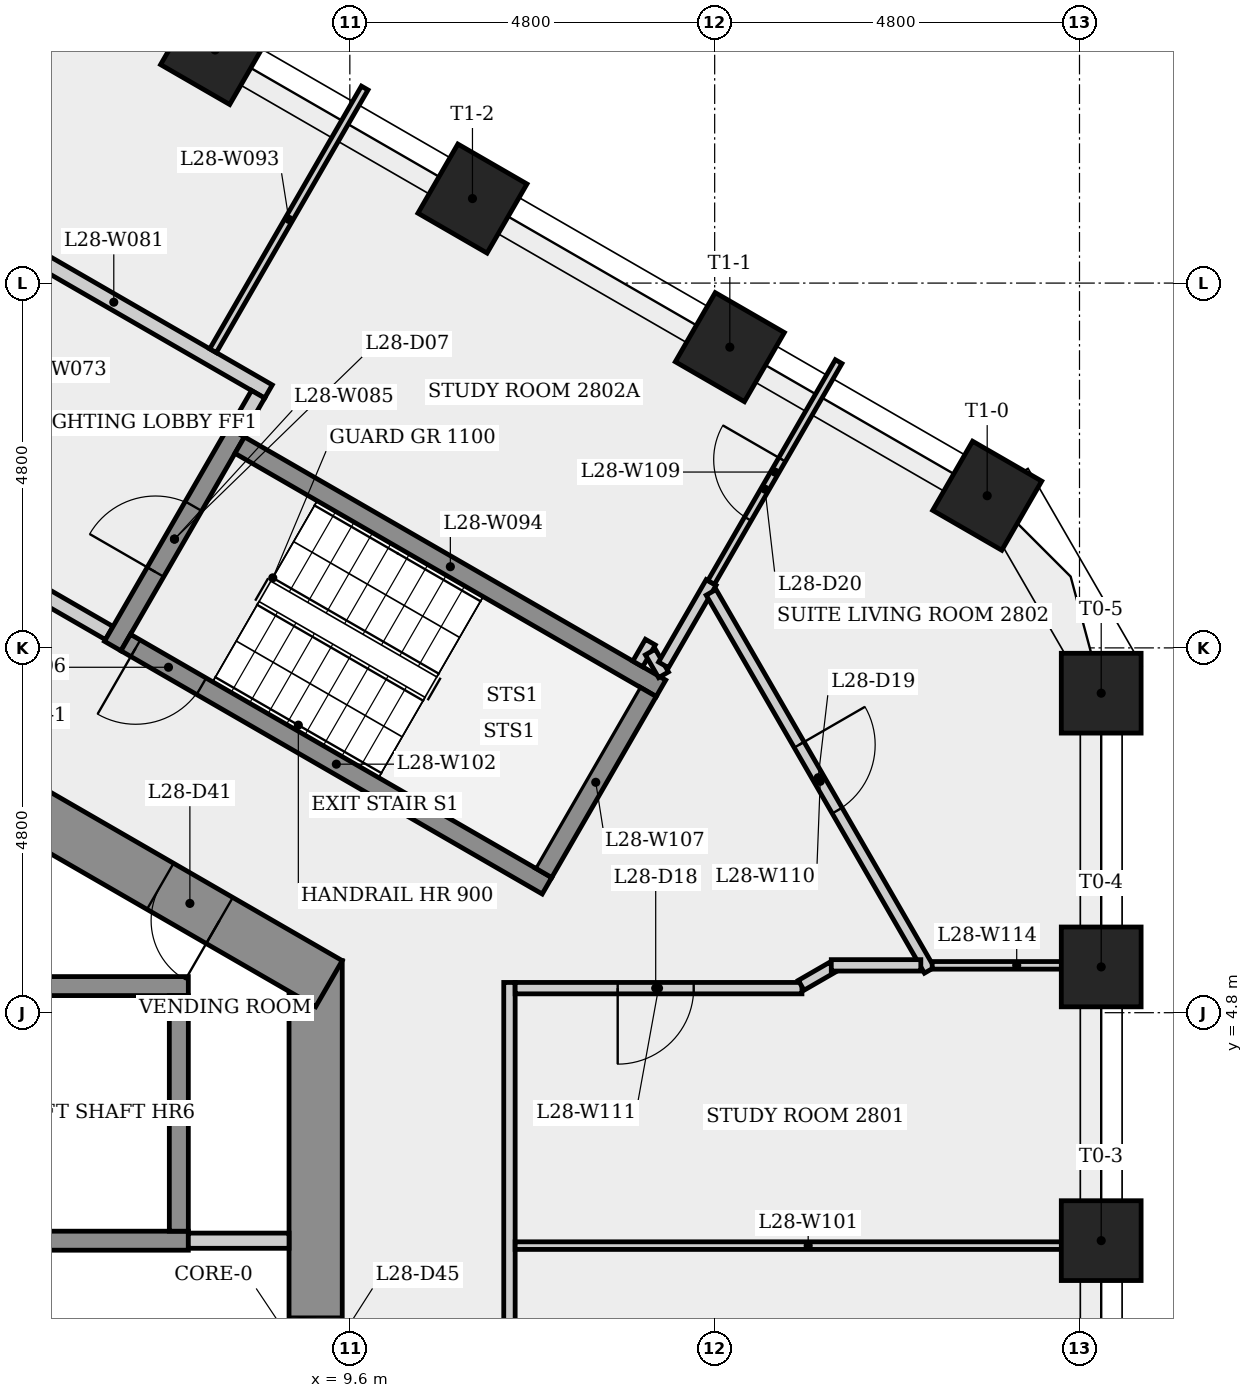
"""IFC4 building model, lengths in metres.
Left out: names, types, materials, properties, quantities, classifications, styles, units other than length and angle.
Written with IfcOpenShell. Run it as: python <this file> out.ifc"""

import sys

from ifc_helpers import new_model, si_unit, direction, frame, frame_2d, origin, origin_2d, place, context, subcontext, project, spatial, rectangle, extrude, element, fill, save


model = new_model("IFC4")
c1 = context("Model", 3, precision=1e-05, world=origin(), true_north=direction((0.0, 1.0)))
c2 = subcontext(c1, "Body", "Model", "MODEL_VIEW")
j1 = project(units=[si_unit("LENGTHUNIT", "METRE"), si_unit("PLANEANGLEUNIT", "RADIAN")], contexts=[c1])
p1 = place(None, origin())
s1 = spatial("IfcSite", under=j1, at=p1, CompositionType="ELEMENT")
p2 = place(p1, origin())
s2 = spatial("IfcBuilding", under=s1, at=p2, CompositionType="ELEMENT")
p3 = place(p2, frame((0.0, 0.0, 106.9)))
s3 = spatial("IfcBuildingStorey", under=s2, at=p3, CompositionType="ELEMENT", Elevation=106.9)
p4 = place(p3, frame((9.15, -5.485, 0.0), z_axis=(0.0, 0.0, 1.0), x_axis=(0.0, 1.0, 0.0)))
e1 = element("IfcWall", 1, at=p4, inside=s3, PredefinedType="SHEAR", context=c2, shape_type="SweptSolid", body=[
    extrude(rectangle(XDim=10.97, YDim=0.7, at=frame_2d((5.485, 0.0))), origin(), (0.0, 0.0, 1.0), 3.4),
])
p5 = place(p4, frame((4.685, 0.0, 0.0)))
e2 = element("IfcOpeningElement", 2, at=p5, cuts=e1, PredefinedType="OPENING", context=c2, shape_type="SweptSolid", body=[
    extrude(rectangle(XDim=1.6, YDim=2.1, at=frame_2d((0.8, 1.05))), frame((0.0, 0.36, 0.0), z_axis=(0.0, -1.0, 0.0), x_axis=(1.0, 0.0, 0.0)), (0.0, 0.0, 1.0), 0.72),
])
p6 = place(p3, frame((9.325, 5.182, 0.0), z_axis=(0.0, 0.0, 1.0), x_axis=(-0.866023993627, 0.500002442456, 0.0)))
e3 = element("IfcWall", 3, at=p6, inside=s3, PredefinedType="SHEAR", context=c2, shape_type="SweptSolid", body=[
    extrude(rectangle(XDim=10.97, YDim=0.7, at=frame_2d((5.485, 0.0))), origin(), (0.0, 0.0, 1.0), 3.4),
])
p7 = place(p6, frame((8.384, 0.0, 0.0)))
e4 = element("IfcOpeningElement", 4, at=p7, cuts=e3, PredefinedType="OPENING", context=c2, shape_type="SweptSolid", body=[
    extrude(rectangle(XDim=0.9, YDim=2.1, at=frame_2d((0.45, 1.05))), frame((0.0, 0.36, 0.0), z_axis=(0.0, -1.0, 0.0), x_axis=(1.0, 0.0, 0.0)), (0.0, 0.0, 1.0), 0.72),
])
p8 = place(p6, frame((1.663, 0.0, 0.0)))
e5 = element("IfcOpeningElement", 5, at=p8, cuts=e3, PredefinedType="OPENING", context=c2, shape_type="SweptSolid", body=[
    extrude(rectangle(XDim=0.9, YDim=2.1, at=frame_2d((0.45, 1.05))), frame((0.0, 0.36, 0.0), z_axis=(0.0, -1.0, 0.0), x_axis=(1.0, 0.0, 0.0)), (0.0, 0.0, 1.0), 0.72),
])
for number, where, z_axis, x_axis in (
    (6, (19.486, 1.801, 0.0), (0.0, 0.0, 1.0), (1.0, 0.0, 0.0)),
    (7, (19.486, 5.402, 0.0), (0.0, 0.0, 1.0), (1.0, 0.0, 0.0)),
    (8, (19.486, 9.004, 0.0), (0.0, 0.0, 1.0), (1.0, 0.0, 0.0)),
    (9, (17.986, 11.602, 0.0), (0.0, 0.0, 1.0), (0.5, 0.866, 0.0)),
    (10, (14.599, 13.557, 0.0), (0.0, 0.0, 1.0), (0.5, 0.866, 0.0)),
    (11, (11.213, 15.512, 0.0), (0.0, 0.0, 1.0), (0.5, 0.866, 0.0)),
    (12, (7.827, 17.467, 0.0), (0.0, 0.0, 1.0), (0.5, 0.866, 0.0)),
):
    element("IfcColumn", number, at=place(p3, frame(where, z_axis=z_axis, x_axis=x_axis)), inside=s3, PredefinedType="COLUMN", context=c2, shape_type="SweptSolid", body=[
        extrude(rectangle(XDim=1.05, YDim=1.05, at=origin_2d()), origin(), (0.0, 0.0, 1.0), 3.4),
    ])
p9 = place(p3, frame((-7.475, 1.8, 0.0), z_axis=(0.0, 0.0, 1.0), x_axis=(1.0, 0.0, 0.0)))
e13 = element("IfcWall", 13, at=p9, inside=s3, PredefinedType="SHEAR", context=c2, shape_type="SweptSolid", body=[
    extrude(rectangle(XDim=14.95, YDim=0.25, at=frame_2d((7.475, 0.0))), origin(), (0.0, 0.0, 1.0), 3.05),
])
p10 = place(p3, frame((-7.225, 5.15, 0.0), z_axis=(0.0, 0.0, 1.0), x_axis=(1.0, 0.0, 0.0)))
e14 = element("IfcWall", 14, at=p10, inside=s3, PredefinedType="SHEAR", context=c2, shape_type="SweptSolid", body=[
    extrude(rectangle(XDim=14.7, YDim=0.25, at=frame_2d((7.35, 0.0))), origin(), (0.0, 0.0, 1.0), 3.05),
])
p11 = place(p3, frame((4.459, 15.323, 0.0), z_axis=(0.0, 0.0, 1.0), x_axis=(0.866016039709, -0.500016218704, 0.0)))
e15 = element("IfcWall", 15, at=p11, inside=s3, PredefinedType="PARTITIONING", context=c2, shape_type="SweptSolid", body=[
    extrude(rectangle(XDim=4.7, YDim=0.2, at=frame_2d((2.35, 0.0))), origin(), (0.0, 0.0, 1.0), 3.05),
])
p12 = place(p3, frame((6.435, 9.795, 0.0), z_axis=(0.0, 0.0, 1.0), x_axis=(-0.866012907634, 0.500021643343, 0.0)))
e16 = element("IfcWall", 16, at=p12, inside=s3, PredefinedType="PARTITIONING", context=c2, shape_type="SweptSolid", body=[
    extrude(rectangle(XDim=4.45, YDim=0.2, at=frame_2d((2.225, 0.0))), origin(), (0.0, 0.0, 1.0), 3.05),
])
p13 = place(p12, frame((1.675, 0.0, 0.0)))
e17 = element("IfcOpeningElement", 17, at=p13, cuts=e16, PredefinedType="OPENING", context=c2, shape_type="SweptSolid", body=[
    extrude(rectangle(XDim=1.1, YDim=2.1, at=frame_2d((0.55, 1.05))), frame((0.0, 0.11, 0.0), z_axis=(0.0, -1.0, 0.0), x_axis=(1.0, 0.0, 0.0)), (0.0, 0.0, 1.0), 0.22),
])
p14 = place(p3, frame((6.48, 9.624, 0.0), z_axis=(0.0, 0.0, 1.0), x_axis=(0.500017246033, 0.866015446554, 0.0)))
e18 = element("IfcWall", 18, at=p14, inside=s3, PredefinedType="SHEAR", context=c2, shape_type="SweptSolid", body=[
    extrude(rectangle(XDim=3.25, YDim=0.25, at=frame_2d((1.625, 0.0))), origin(), (0.0, 0.0, 1.0), 3.05),
])
p15 = place(p14, frame((1.125, 0.0, 0.0)))
e19 = element("IfcOpeningElement", 19, at=p15, cuts=e18, PredefinedType="OPENING", context=c2, shape_type="SweptSolid", body=[
    extrude(rectangle(XDim=1.0, YDim=2.1, at=frame_2d((0.5, 1.05))), frame((0.0, 0.135, 0.0), z_axis=(0.0, -1.0, 0.0), x_axis=(1.0, 0.0, 0.0)), (0.0, 0.0, 1.0), 0.27),
])
p16 = place(p3, frame((7.475, 1.8, 0.0), z_axis=(0.0, 0.0, 1.0), x_axis=(1.0, 0.0, 0.0)))
e20 = element("IfcWall", 20, at=p16, inside=s3, PredefinedType="PARTITIONING", context=c2, shape_type="SweptSolid", body=[
    extrude(rectangle(XDim=1.325, YDim=0.2, at=frame_2d((0.663, 0.0))), origin(), (0.0, 0.0, 1.0), 3.05),
])
p17 = place(p3, frame((7.35, 5.025, 0.0), z_axis=(0.0, 0.0, 1.0), x_axis=(0.0, -1.0, 0.0)))
e21 = element("IfcWall", 21, at=p17, inside=s3, PredefinedType="SHEAR", context=c2, shape_type="SweptSolid", body=[
    extrude(rectangle(XDim=3.1, YDim=0.25, at=frame_2d((1.55, 0.0))), origin(), (0.0, 0.0, 1.0), 3.4),
])
p18 = place(p3, frame((7.8, 13.51, 0.0), z_axis=(0.0, 0.0, 1.0), x_axis=(0.500020748167, 0.866013424493, 0.0)))
e22 = element("IfcWall", 22, at=p18, inside=s3, PredefinedType="PARTITIONING", context=c2, shape_type="SweptSolid", body=[
    extrude(rectangle(XDim=3.991, YDim=0.1, at=frame_2d((1.996, 0.0))), origin(), (0.0, 0.0, 1.0), 3.05),
])
p19 = place(p3, frame((8.151, 12.268, 0.0), z_axis=(0.0, 0.0, 1.0), x_axis=(0.866025499775, -0.499999833739, 0.0)))
e23 = element("IfcWall", 23, at=p19, inside=s3, PredefinedType="SHEAR", context=c2, shape_type="SweptSolid", body=[
    extrude(rectangle(XDim=6.4, YDim=0.25, at=frame_2d((3.2, 0.0))), origin(), (0.0, 0.0, 1.0), 3.05),
])
p20 = place(p3, frame((8.393, 12.937, 0.0), z_axis=(0.0, 0.0, 1.0), x_axis=(-0.500065409566, -0.86598763626, 0.0)))
e24 = element("IfcWall", 24, at=p20, inside=s3, PredefinedType="PARTITIONING", context=c2, shape_type="SweptSolid", body=[
    extrude(rectangle(XDim=0.575, YDim=0.2, at=frame_2d((0.288, 0.0))), origin(), (0.0, 0.0, 1.0), 3.05),
])
p21 = place(p3, frame((11.7, -5.348, 0.0), z_axis=(0.0, 0.0, 1.0), x_axis=(0.0, 1.0, 0.0)))
e25 = element("IfcWall", 25, at=p21, inside=s3, PredefinedType="PARTITIONING", context=c2, shape_type="SweptSolid", body=[
    extrude(rectangle(XDim=10.546, YDim=0.15, at=frame_2d((5.273, 0.0))), origin(), (0.0, 0.0, 1.0), 3.05),
])
p22 = place(p21, frame((3.027, 0.0, 0.0)))
e26 = element("IfcOpeningElement", 26, at=p22, cuts=e25, PredefinedType="OPENING", context=c2, shape_type="SweptSolid", body=[
    extrude(rectangle(XDim=1.0, YDim=2.1, at=frame_2d((0.5, 1.05))), frame((0.0, 0.085, 0.0), z_axis=(0.0, -1.0, 0.0), x_axis=(1.0, 0.0, 0.0)), (0.0, 0.0, 1.0), 0.17),
])
p23 = place(p3, frame((11.775, 1.735, 0.0), z_axis=(0.0, 0.0, 1.0), x_axis=(1.0, 0.0, 0.0)))
e27 = element("IfcWall", 27, at=p23, inside=s3, PredefinedType="PARTITIONING", context=c2, shape_type="SweptSolid", body=[
    extrude(rectangle(XDim=7.711, YDim=0.1, at=frame_2d((3.855, 0.0))), origin(), (0.0, 0.0, 1.0), 3.05),
])
p24 = place(p3, frame((12.194, 6.47, 0.0), z_axis=(0.0, 0.0, 1.0), x_axis=(-0.866025499775, 0.499999833739, 0.0)))
e28 = element("IfcWall", 28, at=p24, inside=s3, PredefinedType="SHEAR", context=c2, shape_type="SweptSolid", body=[
    extrude(rectangle(XDim=6.4, YDim=0.25, at=frame_2d((3.2, 0.0))), origin(), (0.0, 0.0, 1.0), 3.05),
])
p25 = place(p24, frame((5.25, 0.0, 0.0)))
e29 = element("IfcOpeningElement", 29, at=p25, cuts=e28, PredefinedType="OPENING", context=c2, shape_type="SweptSolid", body=[
    extrude(rectangle(XDim=1.0, YDim=2.1, at=frame_2d((0.5, 1.05))), frame((0.0, 0.135, 0.0), z_axis=(0.0, -1.0, 0.0), x_axis=(1.0, 0.0, 0.0)), (0.0, 0.0, 1.0), 0.27),
])
p26 = place(p3, frame((13.388, 9.389, 0.0), z_axis=(0.0, 0.0, 1.0), x_axis=(0.499786267378, 0.866148767211, 0.0)))
e30 = element("IfcWall", 30, at=p26, inside=s3, PredefinedType="PARTITIONING", context=c2, shape_type="SweptSolid", body=[
    extrude(rectangle(XDim=0.331, YDim=0.15, at=frame_2d((0.166, 0.0))), origin(), (0.0, 0.0, 1.0), 3.05),
])
p27 = place(p3, frame((13.554, 9.546, 0.0), z_axis=(0.0, 0.0, 1.0), x_axis=(0.500535972651, -0.865715738613, 0.0)))
e31 = element("IfcWall", 31, at=p27, inside=s3, PredefinedType="PARTITIONING", context=c2, shape_type="SweptSolid", body=[
    extrude(rectangle(XDim=0.346, YDim=0.15, at=frame_2d((0.173, 0.0))), origin(), (0.0, 0.0, 1.0), 3.05),
])
p28 = place(p3, frame((13.523, 9.022, 0.0), z_axis=(0.0, 0.0, 1.0), x_axis=(-0.500034990121, -0.866005201286, 0.0)))
e32 = element("IfcWall", 32, at=p28, inside=s3, PredefinedType="SHEAR", context=c2, shape_type="SweptSolid", body=[
    extrude(rectangle(XDim=2.75, YDim=0.25, at=frame_2d((1.375, 0.0))), origin(), (0.0, 0.0, 1.0), 3.05),
])
p29 = place(p3, frame((13.727, 9.376, 0.0), z_axis=(0.0, 0.0, 1.0), x_axis=(0.500037327496, 0.866003851672, 0.0)))
e33 = element("IfcWall", 33, at=p29, inside=s3, PredefinedType="PARTITIONING", context=c2, shape_type="SweptSolid", body=[
    extrude(rectangle(XDim=1.253, YDim=0.15, at=frame_2d((0.626, 0.0))), origin(), (0.0, 0.0, 1.0), 3.05),
])
p30 = place(p3, frame((14.354, 10.461, 0.0), z_axis=(0.0, 0.0, 1.0), x_axis=(0.499997513821, 0.866026839176, 0.0)))
e34 = element("IfcWall", 34, at=p30, inside=s3, PredefinedType="PARTITIONING", context=c2, shape_type="SweptSolid", body=[
    extrude(rectangle(XDim=3.355, YDim=0.1, at=frame_2d((1.677, 0.0))), origin(), (0.0, 0.0, 1.0), 3.05),
])
p31 = place(p30, frame((0.967, 0.0, 0.0)))
e35 = element("IfcOpeningElement", 35, at=p31, cuts=e34, PredefinedType="OPENING", context=c2, shape_type="SweptSolid", body=[
    extrude(rectangle(XDim=0.9, YDim=2.1, at=frame_2d((0.45, 1.05))), frame((0.0, 0.06, 0.0), z_axis=(0.0, -1.0, 0.0), x_axis=(1.0, 0.0, 0.0)), (0.0, 0.0, 1.0), 0.12),
])
p32 = place(p3, frame((14.354, 10.331, 0.0), z_axis=(0.0, 0.0, 1.0), x_axis=(0.499980071345, -0.866036909293, 0.0)))
e36 = element("IfcWall", 36, at=p32, inside=s3, PredefinedType="PARTITIONING", context=c2, shape_type="SweptSolid", body=[
    extrude(rectangle(XDim=5.742, YDim=0.15, at=frame_2d((2.871, 0.0))), origin(), (0.0, 0.0, 1.0), 3.05),
])
p33 = place(p32, frame((2.316, 0.0, 0.0)))
e37 = element("IfcOpeningElement", 37, at=p33, cuts=e36, PredefinedType="OPENING", context=c2, shape_type="SweptSolid", body=[
    extrude(rectangle(XDim=1.0, YDim=2.1, at=frame_2d((0.5, 1.05))), frame((0.0, 0.085, 0.0), z_axis=(0.0, -1.0, 0.0), x_axis=(1.0, 0.0, 0.0)), (0.0, 0.0, 1.0), 0.17),
])
p34 = place(p3, frame((15.548, 5.123, 0.0), z_axis=(0.0, 0.0, 1.0), x_axis=(-1.0, 0.0, 0.0)))
e38 = element("IfcWall", 38, at=p34, inside=s3, PredefinedType="PARTITIONING", context=c2, shape_type="SweptSolid", body=[
    extrude(rectangle(XDim=3.773, YDim=0.15, at=frame_2d((1.887, 0.0))), origin(), (0.0, 0.0, 1.0), 3.05),
])
p35 = place(p34, frame((1.424, 0.0, 0.0)))
e39 = element("IfcOpeningElement", 39, at=p35, cuts=e38, PredefinedType="OPENING", context=c2, shape_type="SweptSolid", body=[
    extrude(rectangle(XDim=1.0, YDim=2.1, at=frame_2d((0.5, 1.05))), frame((0.0, 0.085, 0.0), z_axis=(0.0, -1.0, 0.0), x_axis=(1.0, 0.0, 0.0)), (0.0, 0.0, 1.0), 0.17),
])
p36 = place(p3, frame((15.949, 5.398, 0.0), z_axis=(0.0, 0.0, 1.0), x_axis=(-0.865954211699, -0.50012328804, 0.0)))
e40 = element("IfcWall", 40, at=p36, inside=s3, PredefinedType="PARTITIONING", context=c2, shape_type="SweptSolid", body=[
    extrude(rectangle(XDim=0.475, YDim=0.15, at=frame_2d((0.237, 0.0))), origin(), (0.0, 0.0, 1.0), 3.05),
])
p37 = place(p3, frame((17.262, 5.423, 0.0), z_axis=(0.0, 0.0, 1.0), x_axis=(1.0, 0.0, 0.0)))
e41 = element("IfcWall", 41, at=p37, inside=s3, PredefinedType="PARTITIONING", context=c2, shape_type="SweptSolid", body=[
    extrude(rectangle(XDim=2.223, YDim=0.1, at=frame_2d((1.112, 0.0))), origin(), (0.0, 0.0, 1.0), 3.05),
])
p38 = place(p3, frame((17.112, 5.423, 0.0), z_axis=(0.0, 0.0, 1.0), x_axis=(-1.0, 0.0, 0.0)))
e42 = element("IfcWall", 42, at=p38, inside=s3, PredefinedType="PARTITIONING", context=c2, shape_type="SweptSolid", body=[
    extrude(rectangle(XDim=1.178, YDim=0.15, at=frame_2d((0.589, 0.0))), origin(), (0.0, 0.0, 1.0), 3.05),
])
p39 = place(p25, origin())
e43 = element("IfcDoor", 43, at=p39, inside=s3, OperationType="SINGLE_SWING_RIGHT", PredefinedType="DOOR", context=c2, shape_type="SweptSolid", body=[
    extrude(rectangle(XDim=1.0, YDim=2.1, at=frame_2d((0.5, 1.05))), frame((0.0, 0.025, 0.0), z_axis=(0.0, -1.0, 0.0), x_axis=(1.0, 0.0, 0.0)), (0.0, 0.0, 1.0), 0.05),
])
fill(e29, e43)
p40 = place(p15, origin())
e44 = element("IfcDoor", 44, at=p40, inside=s3, OperationType="SINGLE_SWING_LEFT", PredefinedType="DOOR", context=c2, shape_type="SweptSolid", body=[
    extrude(rectangle(XDim=1.0, YDim=2.1, at=frame_2d((0.5, 1.05))), frame((0.0, 0.025, 0.0), z_axis=(0.0, -1.0, 0.0), x_axis=(1.0, 0.0, 0.0)), (0.0, 0.0, 1.0), 0.05),
])
fill(e19, e44)
p41 = place(p35, origin())
e45 = element("IfcDoor", 45, at=p41, inside=s3, OperationType="SINGLE_SWING_RIGHT", PredefinedType="DOOR", context=c2, shape_type="SweptSolid", body=[
    extrude(rectangle(XDim=1.0, YDim=2.1, at=frame_2d((0.5, 1.05))), frame((0.0, 0.025, 0.0), z_axis=(0.0, -1.0, 0.0), x_axis=(1.0, 0.0, 0.0)), (0.0, 0.0, 1.0), 0.05),
])
fill(e39, e45)
p42 = place(p33, origin())
e46 = element("IfcDoor", 46, at=p42, inside=s3, OperationType="SINGLE_SWING_LEFT", PredefinedType="DOOR", context=c2, shape_type="SweptSolid", body=[
    extrude(rectangle(XDim=1.0, YDim=2.1, at=frame_2d((0.5, 1.05))), frame((0.0, 0.025, 0.0), z_axis=(0.0, -1.0, 0.0), x_axis=(1.0, 0.0, 0.0)), (0.0, 0.0, 1.0), 0.05),
])
fill(e37, e46)
p43 = place(p31, origin())
e47 = element("IfcDoor", 47, at=p43, inside=s3, OperationType="SINGLE_SWING_RIGHT", PredefinedType="DOOR", context=c2, shape_type="SweptSolid", body=[
    extrude(rectangle(XDim=0.9, YDim=2.1, at=frame_2d((0.45, 1.05))), frame((0.0, 0.025, 0.0), z_axis=(0.0, -1.0, 0.0), x_axis=(1.0, 0.0, 0.0)), (0.0, 0.0, 1.0), 0.05),
])
fill(e35, e47)
p44 = place(p8, origin())
e48 = element("IfcDoor", 48, at=p44, inside=s3, OperationType="SINGLE_SWING_LEFT", PredefinedType="DOOR", context=c2, shape_type="SweptSolid", body=[
    extrude(rectangle(XDim=0.9, YDim=2.1, at=frame_2d((0.45, 1.05))), frame((0.0, 0.025, 0.0), z_axis=(0.0, -1.0, 0.0), x_axis=(1.0, 0.0, 0.0)), (0.0, 0.0, 1.0), 0.05),
])
fill(e5, e48)
p45 = place(p5, origin())
e49 = element("IfcDoor", 49, at=p45, inside=s3, OperationType="SINGLE_SWING_LEFT", PredefinedType="DOOR", context=c2, shape_type="SweptSolid", body=[
    extrude(rectangle(XDim=1.6, YDim=2.1, at=frame_2d((0.8, 1.05))), frame((0.0, 0.025, 0.0), z_axis=(0.0, -1.0, 0.0), x_axis=(1.0, 0.0, 0.0)), (0.0, 0.0, 1.0), 0.05),
])
fill(e2, e49)
save(model, sys.argv[1])
